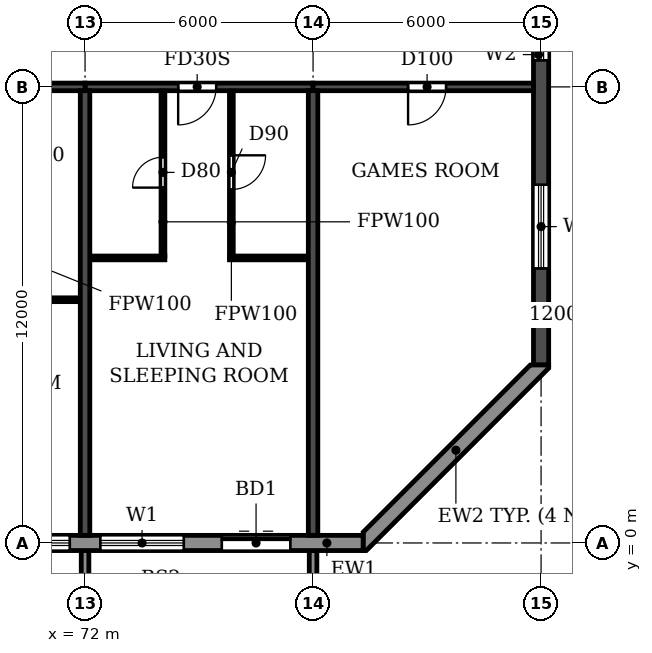
"""IFC4 building model, lengths in metres.
Left out: names, types, materials, properties, quantities, classifications, styles, units other than length and angle.
Written with IfcOpenShell. Run it as: python <this file> out.ifc"""

import sys

from ifc_helpers import new_model, si_unit, direction, frame, frame_2d, origin, place, context, subcontext, project, spatial, polyline, rectangle, outline, extrude, source, transform, mapped, element, fill, save


model = new_model("IFC4")
c1 = context("Model", 3, precision=1e-05, world=origin(), true_north=direction((0.0, 1.0)))
c2 = subcontext(c1, "Body", "Model", "MODEL_VIEW")
j1 = project(units=[si_unit("LENGTHUNIT", "METRE"), si_unit("PLANEANGLEUNIT", "RADIAN")], contexts=[c1])
p1 = place(None, origin())
s1 = spatial("IfcSite", under=j1, at=p1, CompositionType="ELEMENT")
p2 = place(p1, origin())
s2 = spatial("IfcBuilding", under=s1, at=p2, CompositionType="ELEMENT")
p3 = place(p2, frame((0.0, 0.0, 171.9)))
s3 = spatial("IfcBuildingStorey", under=s2, at=p3, CompositionType="ELEMENT", Elevation=171.9)
for number, where, z_axis, x_axis in (
    (1, (72.0, 0.2, 0.0), (0.0, 0.0, 1.0), (0.0, 1.0, 0.0)),
    (2, (78.0, 0.2, 0.0), (0.0, 0.0, 1.0), (0.0, 1.0, 0.0)),
):
    element("IfcWall", number, at=place(p3, frame(where, z_axis=z_axis, x_axis=x_axis)), inside=s3, PredefinedType="SHEAR", context=c2, shape_type="SweptSolid", body=[
        extrude(rectangle(XDim=11.7, YDim=0.25, at=frame_2d((5.85, 0.0))), origin(), (0.0, 0.0, 1.0), 3.08),
    ])
p4 = place(p3, frame((84.0, 4.683, 0.0), z_axis=(0.0, 0.0, 1.0), x_axis=(0.0, 1.0, 0.0)))
e3 = element("IfcWall", 3, at=p4, inside=s3, PredefinedType="SHEAR", context=c2, shape_type="SweptSolid", body=[
    extrude(rectangle(XDim=31.834, YDim=0.4, at=frame_2d((15.917, 0.0))), origin(), (0.0, 0.0, 1.0), 3.08),
])
p5 = place(p4, frame((23.817, 0.0, 0.9)))
e4 = element("IfcOpeningElement", 4, at=p5, cuts=e3, PredefinedType="OPENING", context=c2, shape_type="SweptSolid", body=[
    extrude(rectangle(XDim=1.2, YDim=1.5, at=frame_2d((0.6, 0.75))), frame((0.0, 0.21, 0.0), z_axis=(0.0, -1.0, 0.0), x_axis=(1.0, 0.0, 0.0)), (0.0, 0.0, 1.0), 0.42),
])
p6 = place(p4, frame((8.017, 0.0, 0.9)))
e5 = element("IfcOpeningElement", 5, at=p6, cuts=e3, PredefinedType="OPENING", context=c2, shape_type="SweptSolid", body=[
    extrude(rectangle(XDim=1.2, YDim=1.5, at=frame_2d((0.6, 0.75))), frame((0.0, 0.21, 0.0), z_axis=(0.0, -1.0, 0.0), x_axis=(1.0, 0.0, 0.0)), (0.0, 0.0, 1.0), 0.42),
])
p7 = place(p4, frame((27.694, 0.0, 0.6)))
e6 = element("IfcOpeningElement", 6, at=p7, cuts=e3, PredefinedType="OPENING", context=c2, shape_type="SweptSolid", body=[
    extrude(rectangle(XDim=2.2, YDim=1.8, at=frame_2d((1.1, 0.9))), frame((0.0, 0.21, 0.0), z_axis=(0.0, -1.0, 0.0), x_axis=(1.0, 0.0, 0.0)), (0.0, 0.0, 1.0), 0.42),
])
p8 = place(p4, frame((2.541, 0.0, 0.6)))
e7 = element("IfcOpeningElement", 7, at=p8, cuts=e3, PredefinedType="OPENING", context=c2, shape_type="SweptSolid", body=[
    extrude(rectangle(XDim=2.2, YDim=1.8, at=frame_2d((1.1, 0.9))), frame((0.0, 0.21, 0.0), z_axis=(0.0, -1.0, 0.0), x_axis=(1.0, 0.0, 0.0)), (0.0, 0.0, 1.0), 0.42),
])
p9 = place(p4, frame((15.917, 0.0, 0.9)))
e8 = element("IfcOpeningElement", 8, at=p9, cuts=e3, PredefinedType="OPENING", context=c2, shape_type="SweptSolid", body=[
    extrude(rectangle(XDim=1.2, YDim=1.5, at=frame_2d((0.6, 0.75))), frame((0.0, 0.21, 0.0), z_axis=(0.0, -1.0, 0.0), x_axis=(1.0, 0.0, 0.0)), (0.0, 0.0, 1.0), 0.42),
])
p10 = place(p3, frame((66.0, 12.0, 0.0), z_axis=(0.0, 0.0, 1.0), x_axis=(1.0, 0.0, 0.0)))
e9 = element("IfcWall", 9, at=p10, inside=s3, PredefinedType="SHEAR", context=c2, shape_type="SweptSolid", body=[
    extrude(rectangle(XDim=6.0, YDim=0.2, at=frame_2d((3.0, 0.0))), origin(), (0.0, 0.0, 1.0), 2.48),
])
p11 = place(p10, frame((2.55, 0.0, 0.0)))
e10 = element("IfcOpeningElement", 10, at=p11, cuts=e9, PredefinedType="OPENING", context=c2, shape_type="SweptSolid", body=[
    extrude(rectangle(XDim=1.0, YDim=2.1, at=frame_2d((0.5, 1.05))), frame((0.0, 0.11, 0.0), z_axis=(0.0, -1.0, 0.0), x_axis=(1.0, 0.0, 0.0)), (0.0, 0.0, 1.0), 0.22),
])
p12 = place(p3, frame((72.0, 12.0, 0.0), z_axis=(0.0, 0.0, 1.0), x_axis=(1.0, 0.0, 0.0)))
e11 = element("IfcWall", 11, at=p12, inside=s3, PredefinedType="SHEAR", context=c2, shape_type="SweptSolid", body=[
    extrude(rectangle(XDim=6.0, YDim=0.2, at=frame_2d((3.0, 0.0))), origin(), (0.0, 0.0, 1.0), 2.48),
])
p13 = place(p12, frame((2.45, 0.0, 0.0)))
e12 = element("IfcOpeningElement", 12, at=p13, cuts=e11, PredefinedType="OPENING", context=c2, shape_type="SweptSolid", body=[
    extrude(rectangle(XDim=1.0, YDim=2.1, at=frame_2d((0.5, 1.05))), frame((0.0, 0.11, 0.0), z_axis=(0.0, -1.0, 0.0), x_axis=(1.0, 0.0, 0.0)), (0.0, 0.0, 1.0), 0.22),
])
p14 = place(p3, frame((78.0, 12.0, 0.0), z_axis=(0.0, 0.0, 1.0), x_axis=(1.0, 0.0, 0.0)))
e13 = element("IfcWall", 13, at=p14, inside=s3, PredefinedType="SHEAR", context=c2, shape_type="SweptSolid", body=[
    extrude(rectangle(XDim=5.8, YDim=0.2, at=frame_2d((2.9, 0.0))), origin(), (0.0, 0.0, 1.0), 2.48),
])
p15 = place(p14, frame((2.5, 0.0, 0.0)))
e14 = element("IfcOpeningElement", 14, at=p15, cuts=e13, PredefinedType="OPENING", context=c2, shape_type="SweptSolid", body=[
    extrude(rectangle(XDim=1.0, YDim=2.1, at=frame_2d((0.5, 1.05))), frame((0.0, 0.11, 0.0), z_axis=(0.0, -1.0, 0.0), x_axis=(1.0, 0.0, 0.0)), (0.0, 0.0, 1.0), 0.22),
])
p16 = place(p3, frame((22.683, 0.0, 0.0), z_axis=(0.0, 0.0, 1.0), x_axis=(1.0, 0.0, 0.0)))
e15 = element("IfcWall", 15, at=p16, inside=s3, PredefinedType="STANDARD", context=c2, shape_type="SweptSolid", body=[
    extrude(rectangle(XDim=56.634, YDim=0.4, at=frame_2d((28.317, 0.0))), origin(), (0.0, 0.0, 1.0), 3.08),
])
p17 = place(p16, frame((1.717, 0.0, 0.9)))
e16 = element("IfcOpeningElement", 16, at=p17, cuts=e15, PredefinedType="OPENING", context=c2, shape_type="SweptSolid", body=[
    extrude(rectangle(XDim=2.2, YDim=1.5, at=frame_2d((1.1, 0.75))), frame((0.0, 0.21, 0.0), z_axis=(0.0, -1.0, 0.0), x_axis=(1.0, 0.0, 0.0)), (0.0, 0.0, 1.0), 0.42),
])
p18 = place(p16, frame((4.917, 0.0, 0.0)))
e17 = element("IfcOpeningElement", 17, at=p18, cuts=e15, PredefinedType="OPENING", context=c2, shape_type="SweptSolid", body=[
    extrude(rectangle(XDim=1.8, YDim=2.4, at=frame_2d((0.9, 1.2))), frame((0.0, 0.21, 0.0), z_axis=(0.0, -1.0, 0.0), x_axis=(1.0, 0.0, 0.0)), (0.0, 0.0, 1.0), 0.42),
])
p19 = place(p16, frame((7.717, 0.0, 0.9)))
e18 = element("IfcOpeningElement", 18, at=p19, cuts=e15, PredefinedType="OPENING", context=c2, shape_type="SweptSolid", body=[
    extrude(rectangle(XDim=2.2, YDim=1.5, at=frame_2d((1.1, 0.75))), frame((0.0, 0.21, 0.0), z_axis=(0.0, -1.0, 0.0), x_axis=(1.0, 0.0, 0.0)), (0.0, 0.0, 1.0), 0.42),
])
p20 = place(p16, frame((10.717, 0.0, 0.9)))
e19 = element("IfcOpeningElement", 19, at=p20, cuts=e15, PredefinedType="OPENING", context=c2, shape_type="SweptSolid", body=[
    extrude(rectangle(XDim=2.2, YDim=1.5, at=frame_2d((1.1, 0.75))), frame((0.0, 0.21, 0.0), z_axis=(0.0, -1.0, 0.0), x_axis=(1.0, 0.0, 0.0)), (0.0, 0.0, 1.0), 0.42),
])
p21 = place(p16, frame((13.717, 0.0, 0.9)))
e20 = element("IfcOpeningElement", 20, at=p21, cuts=e15, PredefinedType="OPENING", context=c2, shape_type="SweptSolid", body=[
    extrude(rectangle(XDim=2.2, YDim=1.5, at=frame_2d((1.1, 0.75))), frame((0.0, 0.21, 0.0), z_axis=(0.0, -1.0, 0.0), x_axis=(1.0, 0.0, 0.0)), (0.0, 0.0, 1.0), 0.42),
])
p22 = place(p16, frame((16.917, 0.0, 0.0)))
e21 = element("IfcOpeningElement", 21, at=p22, cuts=e15, PredefinedType="OPENING", context=c2, shape_type="SweptSolid", body=[
    extrude(rectangle(XDim=1.8, YDim=2.4, at=frame_2d((0.9, 1.2))), frame((0.0, 0.21, 0.0), z_axis=(0.0, -1.0, 0.0), x_axis=(1.0, 0.0, 0.0)), (0.0, 0.0, 1.0), 0.42),
])
p23 = place(p16, frame((19.717, 0.0, 0.9)))
e22 = element("IfcOpeningElement", 22, at=p23, cuts=e15, PredefinedType="OPENING", context=c2, shape_type="SweptSolid", body=[
    extrude(rectangle(XDim=2.2, YDim=1.5, at=frame_2d((1.1, 0.75))), frame((0.0, 0.21, 0.0), z_axis=(0.0, -1.0, 0.0), x_axis=(1.0, 0.0, 0.0)), (0.0, 0.0, 1.0), 0.42),
])
p24 = place(p16, frame((22.717, 0.0, 0.9)))
e23 = element("IfcOpeningElement", 23, at=p24, cuts=e15, PredefinedType="OPENING", context=c2, shape_type="SweptSolid", body=[
    extrude(rectangle(XDim=2.2, YDim=1.5, at=frame_2d((1.1, 0.75))), frame((0.0, 0.21, 0.0), z_axis=(0.0, -1.0, 0.0), x_axis=(1.0, 0.0, 0.0)), (0.0, 0.0, 1.0), 0.42),
])
p25 = place(p16, frame((25.917, 0.0, 0.0)))
e24 = element("IfcOpeningElement", 24, at=p25, cuts=e15, PredefinedType="OPENING", context=c2, shape_type="SweptSolid", body=[
    extrude(rectangle(XDim=1.8, YDim=2.4, at=frame_2d((0.9, 1.2))), frame((0.0, 0.21, 0.0), z_axis=(0.0, -1.0, 0.0), x_axis=(1.0, 0.0, 0.0)), (0.0, 0.0, 1.0), 0.42),
])
p26 = place(p16, frame((28.717, 0.0, 0.9)))
e25 = element("IfcOpeningElement", 25, at=p26, cuts=e15, PredefinedType="OPENING", context=c2, shape_type="SweptSolid", body=[
    extrude(rectangle(XDim=2.2, YDim=1.5, at=frame_2d((1.1, 0.75))), frame((0.0, 0.21, 0.0), z_axis=(0.0, -1.0, 0.0), x_axis=(1.0, 0.0, 0.0)), (0.0, 0.0, 1.0), 0.42),
])
p27 = place(p16, frame((31.717, 0.0, 0.9)))
e26 = element("IfcOpeningElement", 26, at=p27, cuts=e15, PredefinedType="OPENING", context=c2, shape_type="SweptSolid", body=[
    extrude(rectangle(XDim=2.2, YDim=1.5, at=frame_2d((1.1, 0.75))), frame((0.0, 0.21, 0.0), z_axis=(0.0, -1.0, 0.0), x_axis=(1.0, 0.0, 0.0)), (0.0, 0.0, 1.0), 0.42),
])
p28 = place(p16, frame((34.717, 0.0, 0.9)))
e27 = element("IfcOpeningElement", 27, at=p28, cuts=e15, PredefinedType="OPENING", context=c2, shape_type="SweptSolid", body=[
    extrude(rectangle(XDim=2.2, YDim=1.5, at=frame_2d((1.1, 0.75))), frame((0.0, 0.21, 0.0), z_axis=(0.0, -1.0, 0.0), x_axis=(1.0, 0.0, 0.0)), (0.0, 0.0, 1.0), 0.42),
])
p29 = place(p16, frame((37.717, 0.0, 0.9)))
e28 = element("IfcOpeningElement", 28, at=p29, cuts=e15, PredefinedType="OPENING", context=c2, shape_type="SweptSolid", body=[
    extrude(rectangle(XDim=2.2, YDim=1.5, at=frame_2d((1.1, 0.75))), frame((0.0, 0.21, 0.0), z_axis=(0.0, -1.0, 0.0), x_axis=(1.0, 0.0, 0.0)), (0.0, 0.0, 1.0), 0.42),
])
p30 = place(p16, frame((40.917, 0.0, 0.0)))
e29 = element("IfcOpeningElement", 29, at=p30, cuts=e15, PredefinedType="OPENING", context=c2, shape_type="SweptSolid", body=[
    extrude(rectangle(XDim=1.8, YDim=2.4, at=frame_2d((0.9, 1.2))), frame((0.0, 0.21, 0.0), z_axis=(0.0, -1.0, 0.0), x_axis=(1.0, 0.0, 0.0)), (0.0, 0.0, 1.0), 0.42),
])
p31 = place(p16, frame((43.717, 0.0, 0.9)))
e30 = element("IfcOpeningElement", 30, at=p31, cuts=e15, PredefinedType="OPENING", context=c2, shape_type="SweptSolid", body=[
    extrude(rectangle(XDim=2.2, YDim=1.5, at=frame_2d((1.1, 0.75))), frame((0.0, 0.21, 0.0), z_axis=(0.0, -1.0, 0.0), x_axis=(1.0, 0.0, 0.0)), (0.0, 0.0, 1.0), 0.42),
])
p32 = place(p16, frame((46.717, 0.0, 0.9)))
e31 = element("IfcOpeningElement", 31, at=p32, cuts=e15, PredefinedType="OPENING", context=c2, shape_type="SweptSolid", body=[
    extrude(rectangle(XDim=2.2, YDim=1.5, at=frame_2d((1.1, 0.75))), frame((0.0, 0.21, 0.0), z_axis=(0.0, -1.0, 0.0), x_axis=(1.0, 0.0, 0.0)), (0.0, 0.0, 1.0), 0.42),
])
p33 = place(p16, frame((49.717, 0.0, 0.9)))
e32 = element("IfcOpeningElement", 32, at=p33, cuts=e15, PredefinedType="OPENING", context=c2, shape_type="SweptSolid", body=[
    extrude(rectangle(XDim=2.2, YDim=1.5, at=frame_2d((1.1, 0.75))), frame((0.0, 0.21, 0.0), z_axis=(0.0, -1.0, 0.0), x_axis=(1.0, 0.0, 0.0)), (0.0, 0.0, 1.0), 0.42),
])
p34 = place(p16, frame((52.917, 0.0, 0.0)))
e33 = element("IfcOpeningElement", 33, at=p34, cuts=e15, PredefinedType="OPENING", context=c2, shape_type="SweptSolid", body=[
    extrude(rectangle(XDim=1.8, YDim=2.4, at=frame_2d((0.9, 1.2))), frame((0.0, 0.21, 0.0), z_axis=(0.0, -1.0, 0.0), x_axis=(1.0, 0.0, 0.0)), (0.0, 0.0, 1.0), 0.42),
])
p35 = place(p3, origin())
e34 = element("IfcWall", 34, at=p35, inside=s3, PredefinedType="STANDARD", context=c2, shape_type="SweptSolid", body=[
    extrude(outline(polyline([(79.317, -0.2), (79.4, -0.2), (84.2, 4.6), (84.2, 4.683), (83.717, 4.683), (79.317, 0.283), (79.317, -0.2)])), origin(), (0.0, 0.0, 1.0), 3.08),
])
m1 = source(origin(), c2, "Body", "SweptSolid", [
    extrude(outline(polyline([(0.0, 0.0), (0.2, 0.0), (0.2, 1.65), (0.0, 1.65), (0.0, 0.0)])), origin(), (0.0, 0.0, 1.0), 3.1),
])
for number, where in (
    (35, (71.9, -1.85, 0.0)),
    (36, (77.9, -1.85, 0.0)),
):
    element("IfcWall", number, at=place(p3, frame(where)), inside=s3, PredefinedType="STANDARD", context=c2, shape_type="MappedRepresentation", body=[
        mapped(m1, transform((0.0, 0.0, 0.0))),
    ])
for number, where, z_axis, x_axis in (
    (37, (69.9, 6.4, 0.0), (0.0, 0.0, 1.0), (1.0, 0.0, 0.0)),
    (38, (72.135, 7.5, 0.0), (0.0, 0.0, 1.0), (1.0, 0.0, 0.0)),
):
    element("IfcWall", number, at=place(p3, frame(where, z_axis=z_axis, x_axis=x_axis)), inside=s3, PredefinedType="PARTITIONING", context=c2, shape_type="SweptSolid", body=[
        extrude(rectangle(XDim=1.965, YDim=0.1, at=frame_2d((0.982, 0.0))), origin(), (0.0, 0.0, 1.0), 3.08),
    ])
p36 = place(p3, frame((75.8, 7.5, 0.0), z_axis=(0.0, 0.0, 1.0), x_axis=(1.0, 0.0, 0.0)))
e39 = element("IfcWall", 39, at=p36, inside=s3, PredefinedType="PARTITIONING", context=c2, shape_type="SweptSolid", body=[
    extrude(rectangle(XDim=2.065, YDim=0.1, at=frame_2d((1.032, 0.0))), origin(), (0.0, 0.0, 1.0), 3.08),
])
p37 = place(p3, frame((74.05, 7.55, 0.0), z_axis=(0.0, 0.0, 1.0), x_axis=(0.0, 1.0, 0.0)))
e40 = element("IfcWall", 40, at=p37, inside=s3, PredefinedType="PARTITIONING", context=c2, shape_type="SweptSolid", body=[
    extrude(rectangle(XDim=4.34, YDim=0.1, at=frame_2d((2.17, 0.0))), origin(), (0.0, 0.0, 1.0), 3.08),
])
p38 = place(p37, frame((1.8, 0.0, 0.0)))
e41 = element("IfcOpeningElement", 41, at=p38, cuts=e40, PredefinedType="OPENING", context=c2, shape_type="SweptSolid", body=[
    extrude(rectangle(XDim=0.8, YDim=2.1, at=frame_2d((0.4, 1.05))), frame((0.0, 0.06, 0.0), z_axis=(0.0, -1.0, 0.0), x_axis=(1.0, 0.0, 0.0)), (0.0, 0.0, 1.0), 0.12),
])
p39 = place(p3, frame((75.85, 7.55, 0.0), z_axis=(0.0, 0.0, 1.0), x_axis=(0.0, 1.0, 0.0)))
e42 = element("IfcWall", 42, at=p39, inside=s3, PredefinedType="PARTITIONING", context=c2, shape_type="SweptSolid", body=[
    extrude(rectangle(XDim=4.34, YDim=0.1, at=frame_2d((2.17, 0.0))), origin(), (0.0, 0.0, 1.0), 3.08),
])
p40 = place(p39, frame((1.75, 0.0, 0.0)))
e43 = element("IfcOpeningElement", 43, at=p40, cuts=e42, PredefinedType="OPENING", context=c2, shape_type="SweptSolid", body=[
    extrude(rectangle(XDim=0.9, YDim=2.1, at=frame_2d((0.45, 1.05))), frame((0.0, 0.06, 0.0), z_axis=(0.0, -1.0, 0.0), x_axis=(1.0, 0.0, 0.0)), (0.0, 0.0, 1.0), 0.12),
])
p41 = place(p32, origin())
e44 = element("IfcWindow", 44, at=p41, inside=s3, PartitioningType="DOUBLE_PANEL_HORIZONTAL", PredefinedType="WINDOW", context=c2, shape_type="SweptSolid", body=[
    extrude(rectangle(XDim=2.2, YDim=1.5, at=frame_2d((1.1, 0.75))), frame((0.0, 0.03, 0.0), z_axis=(0.0, -1.0, 0.0), x_axis=(1.0, 0.0, 0.0)), (0.0, 0.0, 1.0), 0.06),
])
fill(e31, e44)
p42 = place(p33, origin())
e45 = element("IfcWindow", 45, at=p42, inside=s3, PartitioningType="DOUBLE_PANEL_HORIZONTAL", PredefinedType="WINDOW", context=c2, shape_type="SweptSolid", body=[
    extrude(rectangle(XDim=2.2, YDim=1.5, at=frame_2d((1.1, 0.75))), frame((0.0, 0.03, 0.0), z_axis=(0.0, -1.0, 0.0), x_axis=(1.0, 0.0, 0.0)), (0.0, 0.0, 1.0), 0.06),
])
fill(e32, e45)
p43 = place(p34, origin())
e46 = element("IfcDoor", 46, at=p43, inside=s3, OperationType="DOUBLE_DOOR_SLIDING", PredefinedType="DOOR", context=c2, shape_type="SweptSolid", body=[
    extrude(rectangle(XDim=1.8, YDim=2.4, at=frame_2d((0.9, 1.2))), frame((0.0, 0.025, 0.0), z_axis=(0.0, -1.0, 0.0), x_axis=(1.0, 0.0, 0.0)), (0.0, 0.0, 1.0), 0.05),
])
fill(e33, e46)
p44 = place(p6, origin())
e47 = element("IfcWindow", 47, at=p44, inside=s3, PartitioningType="SINGLE_PANEL", PredefinedType="WINDOW", context=c2, shape_type="SweptSolid", body=[
    extrude(rectangle(XDim=1.2, YDim=1.5, at=frame_2d((0.6, 0.75))), frame((0.0, 0.03, 0.0), z_axis=(0.0, -1.0, 0.0), x_axis=(1.0, 0.0, 0.0)), (0.0, 0.0, 1.0), 0.06),
])
fill(e5, e47)
p45 = place(p8, origin())
e48 = element("IfcWindow", 48, at=p45, inside=s3, PartitioningType="DOUBLE_PANEL_HORIZONTAL", PredefinedType="WINDOW", context=c2, shape_type="SweptSolid", body=[
    extrude(rectangle(XDim=2.2, YDim=1.8, at=frame_2d((1.1, 0.9))), frame((0.0, 0.03, 0.0), z_axis=(0.0, -1.0, 0.0), x_axis=(1.0, 0.0, 0.0)), (0.0, 0.0, 1.0), 0.06),
])
fill(e7, e48)
p46 = place(p38, origin())
e49 = element("IfcDoor", 49, at=p46, inside=s3, OperationType="SINGLE_SWING_LEFT", PredefinedType="DOOR", context=c2, shape_type="SweptSolid", body=[
    extrude(rectangle(XDim=0.8, YDim=2.1, at=frame_2d((0.4, 1.05))), frame((0.0, 0.025, 0.0), z_axis=(0.0, -1.0, 0.0), x_axis=(1.0, 0.0, 0.0)), (0.0, 0.0, 1.0), 0.05),
])
fill(e41, e49)
p47 = place(p13, frame((1.0, 0.0, 0.0), z_axis=(0.0, 0.0, 1.0), x_axis=(-1.0, 0.0, 0.0)))
e50 = element("IfcDoor", 50, at=p47, inside=s3, OperationType="SINGLE_SWING_RIGHT", PredefinedType="DOOR", context=c2, shape_type="SweptSolid", body=[
    extrude(rectangle(XDim=1.0, YDim=2.1, at=frame_2d((0.5, 1.05))), frame((0.0, 0.025, 0.0), z_axis=(0.0, -1.0, 0.0), x_axis=(1.0, 0.0, 0.0)), (0.0, 0.0, 1.0), 0.05),
])
fill(e12, e50)
p48 = place(p40, frame((0.9, 0.0, 0.0), z_axis=(0.0, 0.0, 1.0), x_axis=(-1.0, 0.0, 0.0)))
e51 = element("IfcDoor", 51, at=p48, inside=s3, OperationType="SINGLE_SWING_LEFT", PredefinedType="DOOR", context=c2, shape_type="SweptSolid", body=[
    extrude(rectangle(XDim=0.9, YDim=2.1, at=frame_2d((0.45, 1.05))), frame((0.0, 0.025, 0.0), z_axis=(0.0, -1.0, 0.0), x_axis=(1.0, 0.0, 0.0)), (0.0, 0.0, 1.0), 0.05),
])
fill(e43, e51)
p49 = place(p15, frame((1.0, 0.0, 0.0), z_axis=(0.0, 0.0, 1.0), x_axis=(-1.0, 0.0, 0.0)))
e52 = element("IfcDoor", 52, at=p49, inside=s3, OperationType="SINGLE_SWING_RIGHT", PredefinedType="DOOR", context=c2, shape_type="SweptSolid", body=[
    extrude(rectangle(XDim=1.0, YDim=2.1, at=frame_2d((0.5, 1.05))), frame((0.0, 0.025, 0.0), z_axis=(0.0, -1.0, 0.0), x_axis=(1.0, 0.0, 0.0)), (0.0, 0.0, 1.0), 0.05),
])
fill(e14, e52)
save(model, sys.argv[1])
